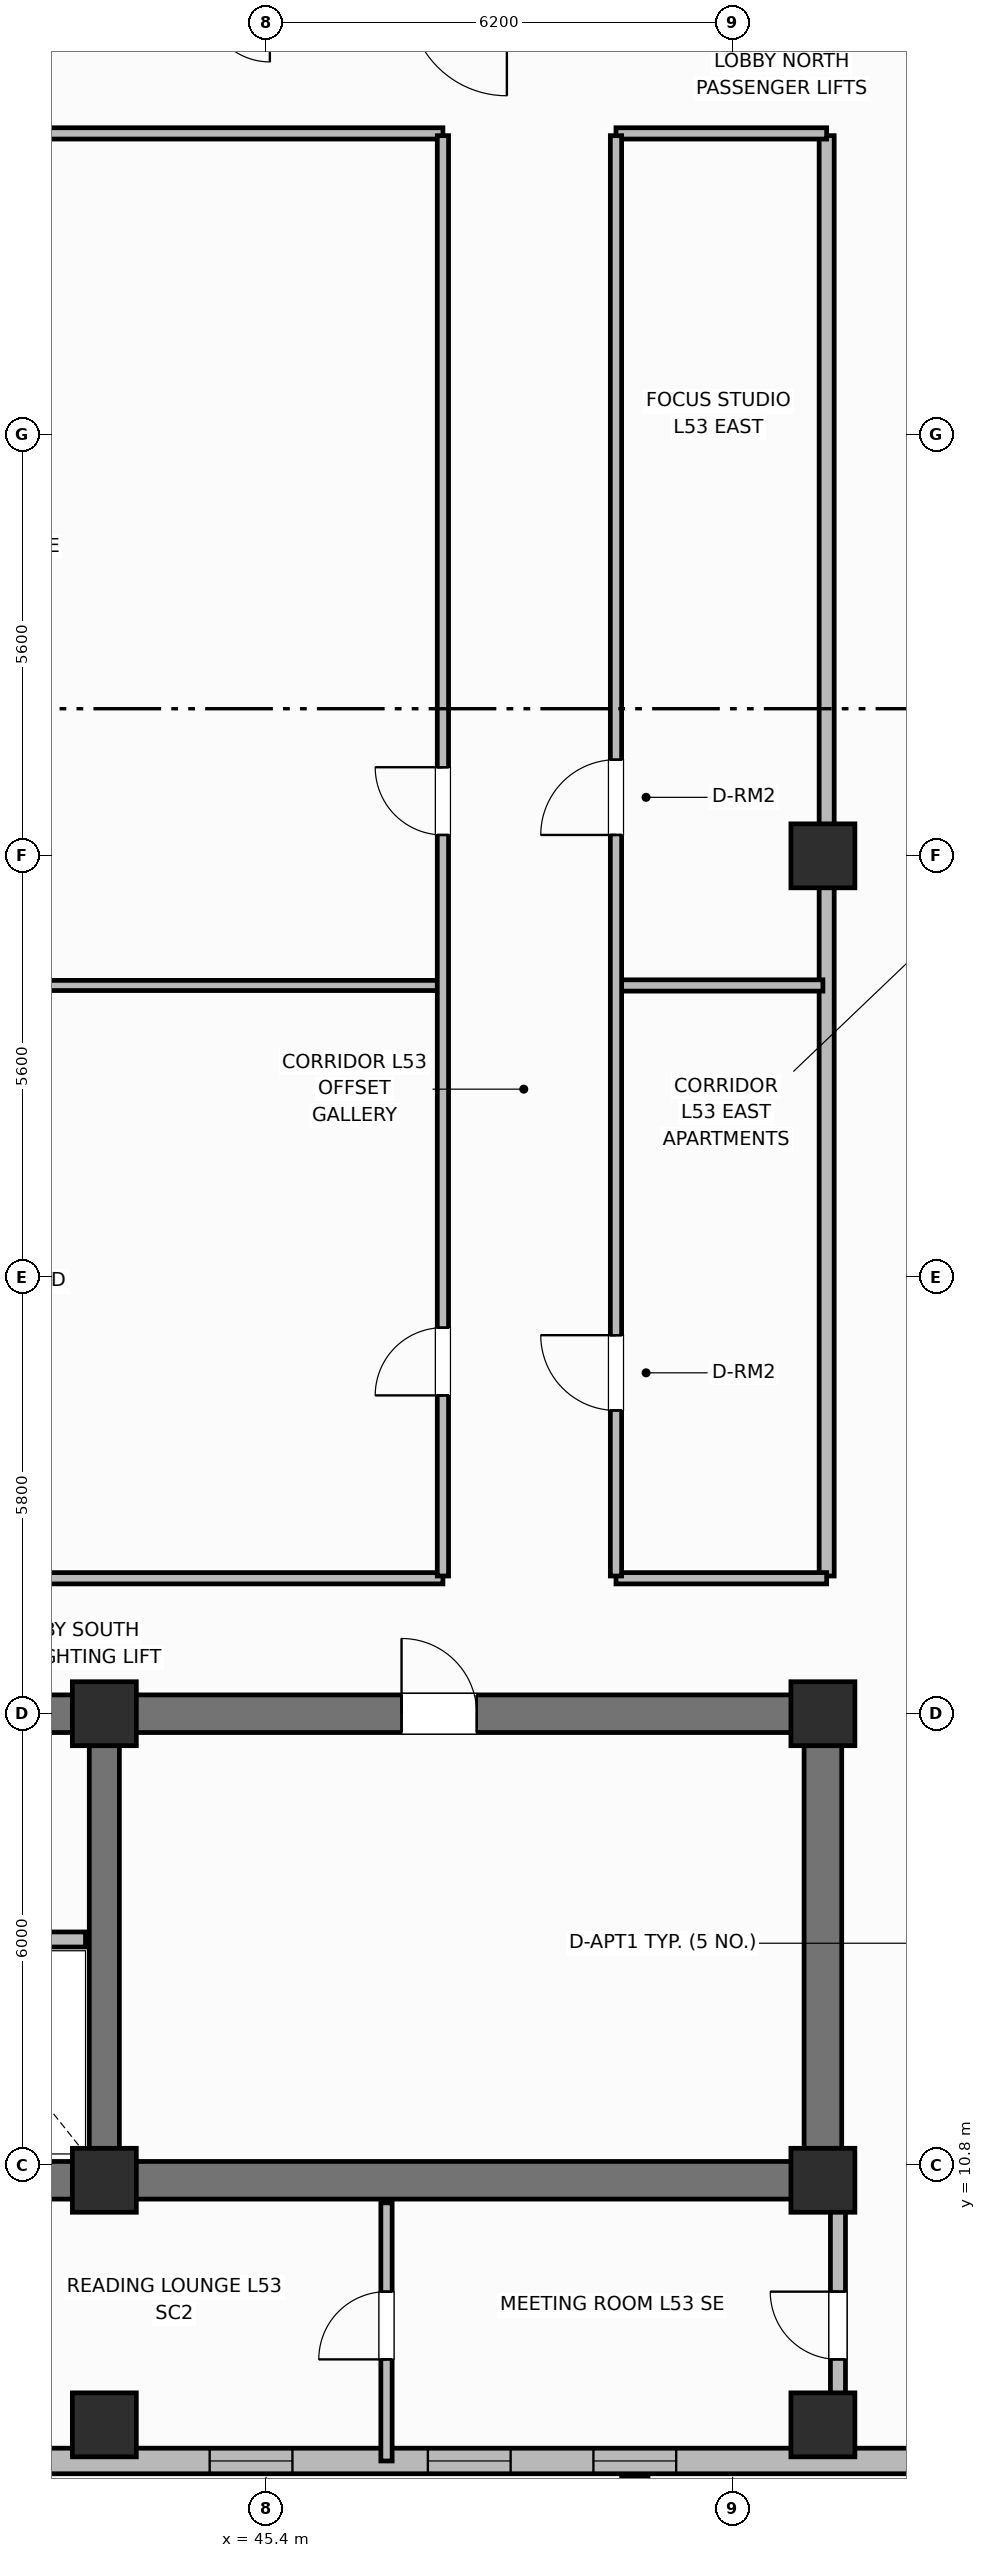
"""IFC4 building model, lengths in metres.
Left out: names, types, materials, properties, quantities, classifications, styles, units other than length and angle.
Written with IfcOpenShell. Run it as: python <this file> out.ifc"""

import sys

from ifc_helpers import new_model, si_unit, direction, frame, frame_2d, origin, origin_2d, place, context, subcontext, project, spatial, rectangle, extrude, element, fill, save


model = new_model("IFC4")
c1 = context("Model", 3, precision=1e-05, world=origin(), true_north=direction((0.0, 1.0)))
c2 = subcontext(c1, "Body", "Model", "MODEL_VIEW")
j1 = project(units=[si_unit("LENGTHUNIT", "METRE"), si_unit("PLANEANGLEUNIT", "RADIAN")], contexts=[c1])
p1 = place(None, origin())
s1 = spatial("IfcSite", under=j1, at=p1, CompositionType="ELEMENT")
p2 = place(p1, origin())
s2 = spatial("IfcBuilding", under=s1, at=p2, CompositionType="ELEMENT")
p3 = place(p2, frame((0.0, 0.0, 214.7)))
s3 = spatial("IfcBuildingStorey", under=s2, at=p3, CompositionType="ELEMENT", Elevation=214.7)
p4 = place(p3, frame((52.8, 10.6, 0.0), z_axis=(0.0, 0.0, 1.0), x_axis=(-1.0, 0.0, 0.0)))
e1 = element("IfcWall", 1, at=p4, inside=s3, PredefinedType="SHEAR", context=c2, shape_type="SweptSolid", body=[
    extrude(rectangle(XDim=27.2, YDim=0.5, at=frame_2d((13.6, 0.0))), origin(), (0.0, 0.0, 1.0), 3.7),
])
p5 = place(p3, frame((52.8, 10.85, 0.0), z_axis=(0.0, 0.0, 1.0), x_axis=(0.0, 1.0, 0.0)))
e2 = element("IfcWall", 2, at=p5, inside=s3, PredefinedType="SHEAR", context=c2, shape_type="SweptSolid", body=[
    extrude(rectangle(XDim=5.7, YDim=0.5, at=frame_2d((2.85, 0.0))), origin(), (0.0, 0.0, 1.0), 3.7),
])
p6 = place(p3, frame((25.6, 16.8, 0.0), z_axis=(0.0, 0.0, 1.0), x_axis=(1.0, 0.0, 0.0)))
e3 = element("IfcWall", 3, at=p6, inside=s3, PredefinedType="SHEAR", context=c2, shape_type="SweptSolid", body=[
    extrude(rectangle(XDim=27.2, YDim=0.5, at=frame_2d((13.6, 0.0))), origin(), (0.0, 0.0, 1.0), 3.7),
])
p7 = place(p6, frame((1.9, 0.0, 0.0)))
e4 = element("IfcOpeningElement", 4, at=p7, cuts=e3, PredefinedType="OPENING", context=c2, shape_type="SweptSolid", body=[
    extrude(rectangle(XDim=1.1, YDim=2.15, at=frame_2d((0.55, 1.075))), frame((0.0, 0.26, 0.0), z_axis=(0.0, -1.0, 0.0), x_axis=(1.0, 0.0, 0.0)), (0.0, 0.0, 1.0), 0.52),
])
p8 = place(p6, frame((13.0, 0.0, 0.0)))
e5 = element("IfcOpeningElement", 5, at=p8, cuts=e3, PredefinedType="OPENING", context=c2, shape_type="SweptSolid", body=[
    extrude(rectangle(XDim=1.2, YDim=2.15, at=frame_2d((0.6, 1.075))), frame((0.0, 0.26, 0.0), z_axis=(0.0, -1.0, 0.0), x_axis=(1.0, 0.0, 0.0)), (0.0, 0.0, 1.0), 0.52),
])
p9 = place(p6, frame((21.6, 0.0, 0.0)))
e6 = element("IfcOpeningElement", 6, at=p9, cuts=e3, PredefinedType="OPENING", context=c2, shape_type="SweptSolid", body=[
    extrude(rectangle(XDim=1.0, YDim=2.15, at=frame_2d((0.5, 1.075))), frame((0.0, 0.26, 0.0), z_axis=(0.0, -1.0, 0.0), x_axis=(1.0, 0.0, 0.0)), (0.0, 0.0, 1.0), 0.52),
])
p10 = place(p3, frame((43.25, 10.85, 0.0), z_axis=(0.0, 0.0, 1.0), x_axis=(0.0, 1.0, 0.0)))
e7 = element("IfcWall", 7, at=p10, inside=s3, PredefinedType="SHEAR", context=c2, shape_type="SweptSolid", body=[
    extrude(rectangle(XDim=5.7, YDim=0.4, at=frame_2d((2.85, 0.0))), origin(), (0.0, 0.0, 1.0), 3.7),
])
for number, where, z_axis, x_axis in (
    (8, (43.25, 10.6, 0.0), (0.0, 0.0, 1.0), (1.0, 0.0, 0.0)),
    (9, (43.25, 16.8, 0.0), (0.0, 0.0, 1.0), (1.0, 0.0, 0.0)),
    (10, (52.8, 10.6, 0.0), (0.0, 0.0, 1.0), (1.0, 0.0, 0.0)),
    (11, (52.8, 16.8, 0.0), (0.0, 0.0, 1.0), (1.0, 0.0, 0.0)),
    (12, (52.8, 28.2, 0.0), (0.0, 0.0, 1.0), (1.0, 0.0, 0.0)),
    (13, (43.25, 7.35, 0.0), (0.0, 0.0, 1.0), (1.0, 0.0, 0.0)),
    (14, (52.8, 7.35, 0.0), (0.0, 0.0, 1.0), (1.0, 0.0, 0.0)),
):
    element("IfcColumn", number, at=place(p3, frame(where, z_axis=z_axis, x_axis=x_axis)), inside=s3, PredefinedType="COLUMN", context=c2, shape_type="SweptSolid", body=[
        extrude(rectangle(XDim=0.85, YDim=0.85, at=origin_2d()), origin(), (0.0, 0.0, 1.0), 3.7),
    ])
p11 = place(p3, frame((42.4, 6.87, 0.0), z_axis=(0.0, 0.0, 1.0), x_axis=(1.0, 0.0, 0.0)))
e15 = element("IfcWall", 15, at=p11, inside=s3, PredefinedType="SOLIDWALL", context=c2, shape_type="SweptSolid", body=[
    extrude(rectangle(XDim=15.8, YDim=0.34, at=frame_2d((7.9, 0.0))), origin(), (0.0, 0.0, 1.0), 2.72),
])
p12 = place(p11, frame((2.25, 0.0, 0.95)))
e16 = element("IfcOpeningElement", 16, at=p12, cuts=e15, PredefinedType="OPENING", context=c2, shape_type="SweptSolid", body=[
    extrude(rectangle(XDim=1.1, YDim=1.65, at=frame_2d((0.55, 0.825))), frame((0.0, 0.18, 0.0), z_axis=(0.0, -1.0, 0.0), x_axis=(1.0, 0.0, 0.0)), (0.0, 0.0, 1.0), 0.36),
])
p13 = place(p11, frame((5.15, 0.0, 0.95)))
e17 = element("IfcOpeningElement", 17, at=p13, cuts=e15, PredefinedType="OPENING", context=c2, shape_type="SweptSolid", body=[
    extrude(rectangle(XDim=1.1, YDim=1.65, at=frame_2d((0.55, 0.825))), frame((0.0, 0.18, 0.0), z_axis=(0.0, -1.0, 0.0), x_axis=(1.0, 0.0, 0.0)), (0.0, 0.0, 1.0), 0.36),
])
p14 = place(p11, frame((7.35, 0.0, 0.95)))
e18 = element("IfcOpeningElement", 18, at=p14, cuts=e15, PredefinedType="OPENING", context=c2, shape_type="SweptSolid", body=[
    extrude(rectangle(XDim=1.1, YDim=1.65, at=frame_2d((0.55, 0.825))), frame((0.0, 0.18, 0.0), z_axis=(0.0, -1.0, 0.0), x_axis=(1.0, 0.0, 0.0)), (0.0, 0.0, 1.0), 0.36),
])
p15 = place(p11, frame((13.15, 0.0, 0.95)))
e19 = element("IfcOpeningElement", 19, at=p15, cuts=e15, PredefinedType="OPENING", context=c2, shape_type="SweptSolid", body=[
    extrude(rectangle(XDim=1.1, YDim=1.65, at=frame_2d((0.55, 0.825))), frame((0.0, 0.18, 0.0), z_axis=(0.0, -1.0, 0.0), x_axis=(1.0, 0.0, 0.0)), (0.0, 0.0, 1.0), 0.36),
])
p16 = place(p3, frame((35.4, 13.8, 0.0), z_axis=(0.0, 0.0, 1.0), x_axis=(1.0, 0.0, 0.0)))
e20 = element("IfcWall", 20, at=p16, inside=s3, PredefinedType="PARTITIONING", context=c2, shape_type="SweptSolid", body=[
    extrude(rectangle(XDim=7.6, YDim=0.2, at=frame_2d((3.8, 0.0))), origin(), (0.0, 0.0, 1.0), 2.32),
])
p17 = place(p16, frame((0.7, 0.0, 0.0)))
e21 = element("IfcOpeningElement", 21, at=p17, cuts=e20, PredefinedType="OPENING", context=c2, shape_type="SweptSolid", body=[
    extrude(rectangle(XDim=1.1, YDim=2.15, at=frame_2d((0.55, 1.075))), frame((0.0, 0.11, 0.0), z_axis=(0.0, -1.0, 0.0), x_axis=(1.0, 0.0, 0.0)), (0.0, 0.0, 1.0), 0.22),
])
p18 = place(p16, frame((3.35, 0.0, 0.0)))
e22 = element("IfcOpeningElement", 22, at=p18, cuts=e20, PredefinedType="OPENING", context=c2, shape_type="SweptSolid", body=[
    extrude(rectangle(XDim=1.2, YDim=2.15, at=frame_2d((0.6, 1.075))), frame((0.0, 0.11, 0.0), z_axis=(0.0, -1.0, 0.0), x_axis=(1.0, 0.0, 0.0)), (0.0, 0.0, 1.0), 0.22),
])
p19 = place(p3, frame((52.85, 18.63, 0.0), z_axis=(0.0, 0.0, 1.0), x_axis=(0.0, 1.0, 0.0)))
e23 = element("IfcWall", 23, at=p19, inside=s3, PredefinedType="PARTITIONING", context=c2, shape_type="SweptSolid", body=[
    extrude(rectangle(XDim=19.14, YDim=0.2, at=frame_2d((9.57, 0.0))), origin(), (0.0, 0.0, 1.0), 2.55),
])
p20 = place(p3, frame((25.55, 18.6, 0.0), z_axis=(0.0, 0.0, 1.0), x_axis=(1.0, 0.0, 0.0)))
e24 = element("IfcWall", 24, at=p20, inside=s3, PredefinedType="PARTITIONING", context=c2, shape_type="SweptSolid", body=[
    extrude(rectangle(XDim=22.2, YDim=0.15, at=frame_2d((11.1, 0.0))), origin(), (0.0, 0.0, 1.0), 2.55),
])
p21 = place(p3, frame((50.05, 18.6, 0.0), z_axis=(0.0, 0.0, 1.0), x_axis=(1.0, 0.0, 0.0)))
e25 = element("IfcWall", 25, at=p21, inside=s3, PredefinedType="PARTITIONING", context=c2, shape_type="SweptSolid", body=[
    extrude(rectangle(XDim=2.8, YDim=0.15, at=frame_2d((1.4, 0.0))), origin(), (0.0, 0.0, 1.0), 2.55),
])
p22 = place(p3, frame((25.55, 37.8, 0.0), z_axis=(0.0, 0.0, 1.0), x_axis=(1.0, 0.0, 0.0)))
e26 = element("IfcWall", 26, at=p22, inside=s3, PredefinedType="PARTITIONING", context=c2, shape_type="SweptSolid", body=[
    extrude(rectangle(XDim=22.2, YDim=0.15, at=frame_2d((11.1, 0.0))), origin(), (0.0, 0.0, 1.0), 2.55),
])
p23 = place(p3, frame((50.05, 37.8, 0.0), z_axis=(0.0, 0.0, 1.0), x_axis=(1.0, 0.0, 0.0)))
e27 = element("IfcWall", 27, at=p23, inside=s3, PredefinedType="PARTITIONING", context=c2, shape_type="SweptSolid", body=[
    extrude(rectangle(XDim=2.8, YDim=0.15, at=frame_2d((1.4, 0.0))), origin(), (0.0, 0.0, 1.0), 2.55),
])
p24 = place(p3, frame((34.95, 26.477, 0.0), z_axis=(0.0, 0.0, 1.0), x_axis=(1.0, 0.0, 0.0)))
e28 = element("IfcWall", 28, at=p24, inside=s3, PredefinedType="PARTITIONING", context=c2, shape_type="SweptSolid", body=[
    extrude(rectangle(XDim=12.81, YDim=0.135, at=frame_2d((6.405, 0.0))), origin(), (0.0, 0.0, 1.0), 2.55),
])
p25 = place(p3, frame((50.08, 26.477, 0.0), z_axis=(0.0, 0.0, 1.0), x_axis=(1.0, 0.0, 0.0)))
e29 = element("IfcWall", 29, at=p25, inside=s3, PredefinedType="PARTITIONING", context=c2, shape_type="SweptSolid", body=[
    extrude(rectangle(XDim=2.72, YDim=0.15, at=frame_2d((1.36, 0.0))), origin(), (0.0, 0.0, 1.0), 2.55),
])
p26 = place(p3, frame((47.75, 18.63, 0.0), z_axis=(0.0, 0.0, 1.0), x_axis=(0.0, 1.0, 0.0)))
e30 = element("IfcWall", 30, at=p26, inside=s3, PredefinedType="PARTITIONING", context=c2, shape_type="SweptSolid", body=[
    extrude(rectangle(XDim=19.14, YDim=0.15, at=frame_2d((9.57, 0.0))), origin(), (0.0, 0.0, 1.0), 2.55),
])
p27 = place(p26, frame((2.4, 0.0, 0.0)))
e31 = element("IfcOpeningElement", 31, at=p27, cuts=e30, PredefinedType="OPENING", context=c2, shape_type="SweptSolid", body=[
    extrude(rectangle(XDim=0.9, YDim=2.1, at=frame_2d((0.45, 1.05))), frame((0.0, 0.085, 0.0), z_axis=(0.0, -1.0, 0.0), x_axis=(1.0, 0.0, 0.0)), (0.0, 0.0, 1.0), 0.17),
])
p28 = place(p26, frame((9.847, 0.0, 0.0)))
e32 = element("IfcOpeningElement", 32, at=p28, cuts=e30, PredefinedType="OPENING", context=c2, shape_type="SweptSolid", body=[
    extrude(rectangle(XDim=0.9, YDim=2.1, at=frame_2d((0.45, 1.05))), frame((0.0, 0.085, 0.0), z_axis=(0.0, -1.0, 0.0), x_axis=(1.0, 0.0, 0.0)), (0.0, 0.0, 1.0), 0.17),
])
p29 = place(p3, frame((50.05, 18.63, 0.0), z_axis=(0.0, 0.0, 1.0), x_axis=(0.0, 1.0, 0.0)))
e33 = element("IfcWall", 33, at=p29, inside=s3, PredefinedType="PARTITIONING", context=c2, shape_type="SweptSolid", body=[
    extrude(rectangle(XDim=19.14, YDim=0.15, at=frame_2d((9.57, 0.0))), origin(), (0.0, 0.0, 1.0), 2.55),
])
p30 = place(p29, frame((2.2, 0.0, 0.0)))
e34 = element("IfcOpeningElement", 34, at=p30, cuts=e33, PredefinedType="OPENING", context=c2, shape_type="SweptSolid", body=[
    extrude(rectangle(XDim=1.0, YDim=2.15, at=frame_2d((0.5, 1.075))), frame((0.0, 0.085, 0.0), z_axis=(0.0, -1.0, 0.0), x_axis=(1.0, 0.0, 0.0)), (0.0, 0.0, 1.0), 0.17),
])
p31 = place(p29, frame((9.847, 0.0, 0.0)))
e35 = element("IfcOpeningElement", 35, at=p31, cuts=e33, PredefinedType="OPENING", context=c2, shape_type="SweptSolid", body=[
    extrude(rectangle(XDim=1.0, YDim=2.15, at=frame_2d((0.5, 1.075))), frame((0.0, 0.085, 0.0), z_axis=(0.0, -1.0, 0.0), x_axis=(1.0, 0.0, 0.0)), (0.0, 0.0, 1.0), 0.17),
])
p32 = place(p3, frame((47.0, 6.87, 0.0), z_axis=(0.0, 0.0, 1.0), x_axis=(0.0, 1.0, 0.0)))
e36 = element("IfcWall", 36, at=p32, inside=s3, PredefinedType="PARTITIONING", context=c2, shape_type="SweptSolid", body=[
    extrude(rectangle(XDim=3.43, YDim=0.15, at=frame_2d((1.715, 0.0))), origin(), (0.0, 0.0, 1.0), 2.55),
])
p33 = place(p32, frame((1.35, 0.0, 0.0)))
e37 = element("IfcOpeningElement", 37, at=p33, cuts=e36, PredefinedType="OPENING", context=c2, shape_type="SweptSolid", body=[
    extrude(rectangle(XDim=0.9, YDim=2.1, at=frame_2d((0.45, 1.05))), frame((0.0, 0.085, 0.0), z_axis=(0.0, -1.0, 0.0), x_axis=(1.0, 0.0, 0.0)), (0.0, 0.0, 1.0), 0.17),
])
p34 = place(p3, frame((53.0, 7.57, 0.0), z_axis=(0.0, 0.0, 1.0), x_axis=(0.0, 1.0, 0.0)))
e38 = element("IfcWall", 38, at=p34, inside=s3, PredefinedType="PARTITIONING", context=c2, shape_type="SweptSolid", body=[
    extrude(rectangle(XDim=2.73, YDim=0.2, at=frame_2d((1.365, 0.0))), origin(), (0.0, 0.0, 1.0), 2.55),
])
p35 = place(p34, frame((0.65, 0.0, 0.0)))
e39 = element("IfcOpeningElement", 39, at=p35, cuts=e38, PredefinedType="OPENING", context=c2, shape_type="SweptSolid", body=[
    extrude(rectangle(XDim=0.9, YDim=2.1, at=frame_2d((0.45, 1.05))), frame((0.0, 0.11, 0.0), z_axis=(0.0, -1.0, 0.0), x_axis=(1.0, 0.0, 0.0)), (0.0, 0.0, 1.0), 0.22),
])
p36 = place(p12, origin())
e40 = element("IfcWindow", 40, at=p36, inside=s3, PartitioningType="SINGLE_PANEL", PredefinedType="WINDOW", context=c2, shape_type="SweptSolid", body=[
    extrude(rectangle(XDim=1.1, YDim=1.65, at=frame_2d((0.55, 0.825))), frame((0.0, 0.03, 0.0), z_axis=(0.0, -1.0, 0.0), x_axis=(1.0, 0.0, 0.0)), (0.0, 0.0, 1.0), 0.06),
])
fill(e16, e40)
p37 = place(p13, origin())
e41 = element("IfcWindow", 41, at=p37, inside=s3, PartitioningType="SINGLE_PANEL", PredefinedType="WINDOW", context=c2, shape_type="SweptSolid", body=[
    extrude(rectangle(XDim=1.1, YDim=1.65, at=frame_2d((0.55, 0.825))), frame((0.0, 0.03, 0.0), z_axis=(0.0, -1.0, 0.0), x_axis=(1.0, 0.0, 0.0)), (0.0, 0.0, 1.0), 0.06),
])
fill(e17, e41)
p38 = place(p14, origin())
e42 = element("IfcWindow", 42, at=p38, inside=s3, PartitioningType="SINGLE_PANEL", PredefinedType="WINDOW", context=c2, shape_type="SweptSolid", body=[
    extrude(rectangle(XDim=1.1, YDim=1.65, at=frame_2d((0.55, 0.825))), frame((0.0, 0.03, 0.0), z_axis=(0.0, -1.0, 0.0), x_axis=(1.0, 0.0, 0.0)), (0.0, 0.0, 1.0), 0.06),
])
fill(e18, e42)
p39 = place(p27, origin())
e43 = element("IfcDoor", 43, at=p39, inside=s3, OperationType="SINGLE_SWING_LEFT", PredefinedType="DOOR", context=c2, shape_type="SweptSolid", body=[
    extrude(rectangle(XDim=0.9, YDim=2.1, at=frame_2d((0.45, 1.05))), frame((0.0, 0.025, 0.0), z_axis=(0.0, -1.0, 0.0), x_axis=(1.0, 0.0, 0.0)), (0.0, 0.0, 1.0), 0.05),
])
fill(e31, e43)
p40 = place(p28, origin())
e44 = element("IfcDoor", 44, at=p40, inside=s3, OperationType="SINGLE_SWING_RIGHT", PredefinedType="DOOR", context=c2, shape_type="SweptSolid", body=[
    extrude(rectangle(XDim=0.9, YDim=2.1, at=frame_2d((0.45, 1.05))), frame((0.0, 0.025, 0.0), z_axis=(0.0, -1.0, 0.0), x_axis=(1.0, 0.0, 0.0)), (0.0, 0.0, 1.0), 0.05),
])
fill(e32, e44)
p41 = place(p30, origin())
e45 = element("IfcDoor", 45, at=p41, inside=s3, OperationType="SINGLE_SWING_RIGHT", PredefinedType="DOOR", context=c2, shape_type="SweptSolid", body=[
    extrude(rectangle(XDim=1.0, YDim=2.15, at=frame_2d((0.5, 1.075))), frame((0.0, 0.025, 0.0), z_axis=(0.0, -1.0, 0.0), x_axis=(1.0, 0.0, 0.0)), (0.0, 0.0, 1.0), 0.05),
])
fill(e34, e45)
p42 = place(p31, origin())
e46 = element("IfcDoor", 46, at=p42, inside=s3, OperationType="SINGLE_SWING_LEFT", PredefinedType="DOOR", context=c2, shape_type="SweptSolid", body=[
    extrude(rectangle(XDim=1.0, YDim=2.15, at=frame_2d((0.5, 1.075))), frame((0.0, 0.025, 0.0), z_axis=(0.0, -1.0, 0.0), x_axis=(1.0, 0.0, 0.0)), (0.0, 0.0, 1.0), 0.05),
])
fill(e35, e46)
p43 = place(p33, origin())
e47 = element("IfcDoor", 47, at=p43, inside=s3, OperationType="SINGLE_SWING_LEFT", PredefinedType="DOOR", context=c2, shape_type="SweptSolid", body=[
    extrude(rectangle(XDim=0.9, YDim=2.1, at=frame_2d((0.45, 1.05))), frame((0.0, 0.025, 0.0), z_axis=(0.0, -1.0, 0.0), x_axis=(1.0, 0.0, 0.0)), (0.0, 0.0, 1.0), 0.05),
])
fill(e37, e47)
p44 = place(p35, origin())
e48 = element("IfcDoor", 48, at=p44, inside=s3, OperationType="SINGLE_SWING_RIGHT", PredefinedType="DOOR", context=c2, shape_type="SweptSolid", body=[
    extrude(rectangle(XDim=0.9, YDim=2.1, at=frame_2d((0.45, 1.05))), frame((0.0, 0.025, 0.0), z_axis=(0.0, -1.0, 0.0), x_axis=(1.0, 0.0, 0.0)), (0.0, 0.0, 1.0), 0.05),
])
fill(e39, e48)
p45 = place(p9, origin())
e49 = element("IfcDoor", 49, at=p45, inside=s3, OperationType="SINGLE_SWING_LEFT", PredefinedType="DOOR", context=c2, shape_type="SweptSolid", body=[
    extrude(rectangle(XDim=1.0, YDim=2.15, at=frame_2d((0.5, 1.075))), frame((0.0, 0.025, 0.0), z_axis=(0.0, -1.0, 0.0), x_axis=(1.0, 0.0, 0.0)), (0.0, 0.0, 1.0), 0.05),
])
fill(e6, e49)
save(model, sys.argv[1])
